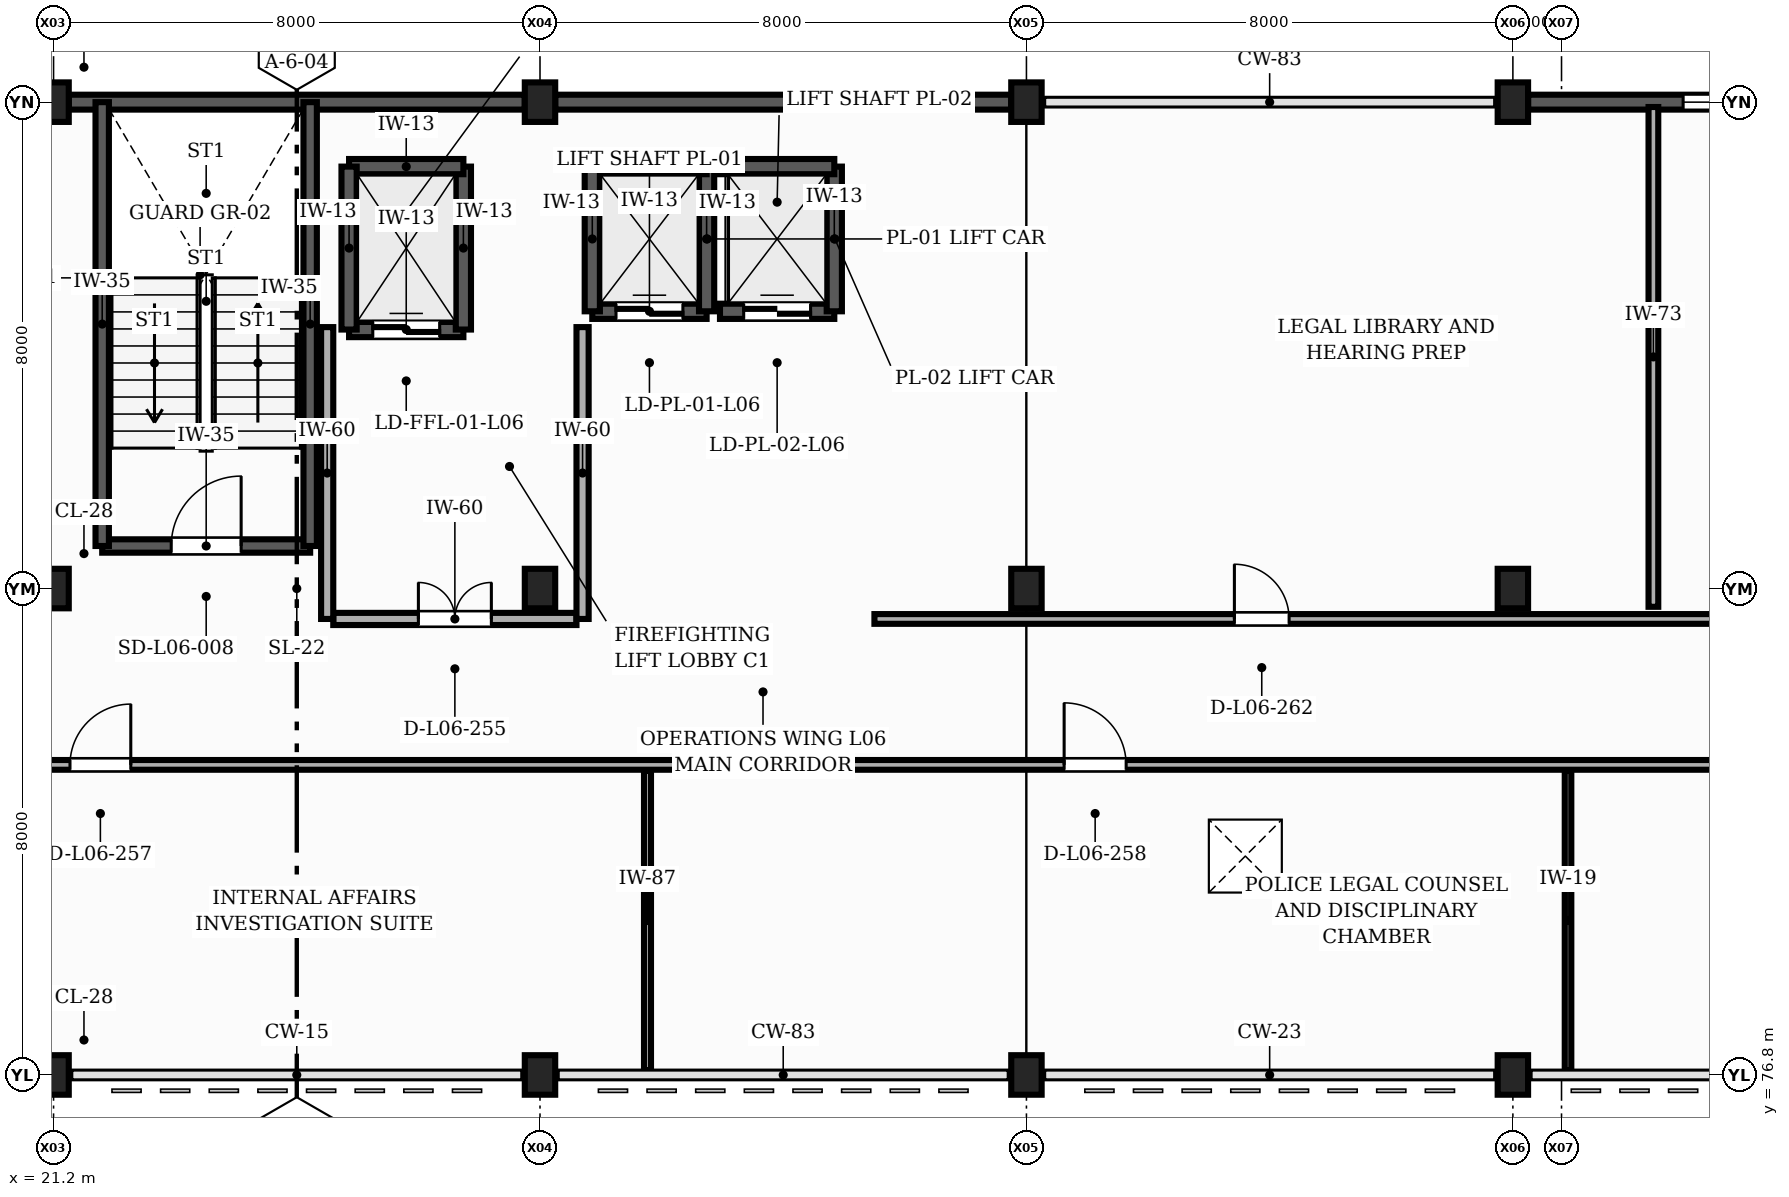
"""IFC4 building model, lengths in metres.
Left out: names, types, materials, properties, quantities, classifications, styles, units other than length and angle.
Written with IfcOpenShell. Run it as: python <this file> out.ifc"""

import sys

from ifc_helpers import new_model, si_unit, direction, frame, frame_2d, origin, origin_2d, place, context, subcontext, project, spatial, rectangle, extrude, element, fill, save


model = new_model("IFC4")
c1 = context("Model", 3, precision=1e-05, world=origin(), true_north=direction((0.0, 1.0)))
c2 = subcontext(c1, "Body", "Model", "MODEL_VIEW")
j1 = project(units=[si_unit("LENGTHUNIT", "METRE"), si_unit("PLANEANGLEUNIT", "RADIAN")], contexts=[c1])
p1 = place(None, origin())
s1 = spatial("IfcSite", under=j1, at=p1, CompositionType="ELEMENT")
p2 = place(p1, origin())
s2 = spatial("IfcBuilding", under=s1, at=p2, CompositionType="ELEMENT")
p3 = place(p2, frame((0.0, 0.0, 25.8)))
s3 = spatial("IfcBuildingStorey", under=s2, at=p3, CompositionType="ELEMENT", Elevation=25.8)
for number, where, z_axis, x_axis in (
    (1, (21.2, 76.8, 0.0), (0.0, 0.0, 1.0), (1.0, 0.0, 0.0)),
    (2, (21.2, 84.8, 0.0), (0.0, 0.0, 1.0), (1.0, 0.0, 0.0)),
    (3, (21.2, 92.8, 0.0), (0.0, 0.0, 1.0), (1.0, 0.0, 0.0)),
    (4, (29.2, 76.8, 0.0), (0.0, 0.0, 1.0), (1.0, 0.0, 0.0)),
    (5, (29.2, 84.8, 0.0), (0.0, 0.0, 1.0), (1.0, 0.0, 0.0)),
    (6, (29.2, 92.8, 0.0), (0.0, 0.0, 1.0), (1.0, 0.0, 0.0)),
    (7, (37.2, 76.8, 0.0), (0.0, 0.0, 1.0), (1.0, 0.0, 0.0)),
    (8, (37.2, 84.8, 0.0), (0.0, 0.0, 1.0), (1.0, 0.0, 0.0)),
    (9, (37.2, 92.8, 0.0), (0.0, 0.0, 1.0), (1.0, 0.0, 0.0)),
    (10, (45.2, 76.8, 0.0), (0.0, 0.0, 1.0), (1.0, 0.0, 0.0)),
    (11, (45.2, 84.8, 0.0), (0.0, 0.0, 1.0), (1.0, 0.0, 0.0)),
    (12, (45.2, 92.8, 0.0), (0.0, 0.0, 1.0), (1.0, 0.0, 0.0)),
):
    element("IfcColumn", number, at=place(p3, frame(where, z_axis=z_axis, x_axis=x_axis)), inside=s3, PredefinedType="COLUMN", context=c2, shape_type="SweptSolid", body=[
        extrude(rectangle(XDim=0.5, YDim=0.65, at=origin_2d()), origin(), (0.0, 0.0, 1.0), 3.9),
    ])
p4 = place(p3, frame((53.75, 92.8, 0.0), z_axis=(0.0, 0.0, 1.0), x_axis=(-1.0, 0.0, 0.0)))
e13 = element("IfcWall", 13, at=p4, inside=s3, PredefinedType="SOLIDWALL", context=c2, shape_type="SweptSolid", body=[
    extrude(rectangle(XDim=8.3, YDim=0.245, at=frame_2d((4.15, 0.0))), origin(), (0.0, 0.0, 1.0), 3.01),
])
p5 = place(p4, frame((2.55, 0.0, 0.9)))
e14 = element("IfcOpeningElement", 14, at=p5, cuts=e13, PredefinedType="OPENING", context=c2, shape_type="SweptSolid", body=[
    extrude(rectangle(XDim=3.2, YDim=1.6, at=frame_2d((1.6, 0.8))), frame((0.0, 0.133, 0.0), z_axis=(0.0, -1.0, 0.0), x_axis=(1.0, 0.0, 0.0)), (0.0, 0.0, 1.0), 0.265),
])
p6 = place(p3, frame((36.95, 92.8, 0.0), z_axis=(0.0, 0.0, 1.0), x_axis=(-1.0, 0.0, 0.0)))
e15 = element("IfcWall", 15, at=p6, inside=s3, PredefinedType="SOLIDWALL", context=c2, shape_type="SweptSolid", body=[
    extrude(rectangle(XDim=7.5, YDim=0.245, at=frame_2d((3.75, 0.0))), origin(), (0.0, 0.0, 1.0), 3.01),
])
p7 = place(p3, frame((28.95, 92.8, 0.0), z_axis=(0.0, 0.0, 1.0), x_axis=(-1.0, 0.0, 0.0)))
e16 = element("IfcWall", 16, at=p7, inside=s3, PredefinedType="SOLIDWALL", context=c2, shape_type="SweptSolid", body=[
    extrude(rectangle(XDim=7.5, YDim=0.245, at=frame_2d((3.75, 0.0))), origin(), (0.0, 0.0, 1.0), 3.66),
])
p8 = place(p3, frame((22.0, 85.5, 0.0), z_axis=(0.0, 0.0, 1.0), x_axis=(1.0, 0.0, 0.0)))
e17 = element("IfcWall", 17, at=p8, inside=s3, PredefinedType="SHEAR", context=c2, shape_type="SweptSolid", body=[
    extrude(rectangle(XDim=3.42, YDim=0.22, at=frame_2d((1.71, 0.0))), origin(), (0.0, 0.0, 1.0), 3.9),
])
p9 = place(p8, frame((1.135, 0.0, 0.0)))
e18 = element("IfcOpeningElement", 18, at=p9, cuts=e17, PredefinedType="OPENING", context=c2, shape_type="SweptSolid", body=[
    extrude(rectangle(XDim=1.15, YDim=2.15, at=frame_2d((0.575, 1.075))), frame((0.0, 0.12, 0.0), z_axis=(0.0, -1.0, 0.0), x_axis=(1.0, 0.0, 0.0)), (0.0, 0.0, 1.0), 0.24),
])
for number, where, z_axis, x_axis in (
    (19, (25.42, 85.5, 0.0), (0.0, 0.0, 1.0), (0.0, 1.0, 0.0)),
    (20, (22.0, 92.8, 0.0), (0.0, 0.0, 1.0), (0.0, -1.0, 0.0)),
):
    element("IfcWall", number, at=place(p3, frame(where, z_axis=z_axis, x_axis=x_axis)), inside=s3, PredefinedType="SHEAR", context=c2, shape_type="SweptSolid", body=[
        extrude(rectangle(XDim=7.3, YDim=0.22, at=frame_2d((3.65, 0.0))), origin(), (0.0, 0.0, 1.0), 3.9),
    ])
p10 = place(p3, frame((26.06, 89.06, 0.0), z_axis=(0.0, 0.0, 1.0), x_axis=(1.0, 0.0, 0.0)))
e21 = element("IfcWall", 21, at=p10, inside=s3, PredefinedType="SHEAR", context=c2, shape_type="SweptSolid", body=[
    extrude(rectangle(XDim=1.88, YDim=0.25, at=frame_2d((0.94, 0.0))), origin(), (0.0, 0.0, 1.0), 3.9),
])
p11 = place(p10, frame((0.39, 0.0, 0.0)))
e22 = element("IfcOpeningElement", 22, at=p11, cuts=e21, PredefinedType="OPENING", context=c2, shape_type="SweptSolid", body=[
    extrude(rectangle(XDim=1.1, YDim=2.2, at=frame_2d((0.55, 1.1))), frame((0.0, 0.135, 0.0), z_axis=(0.0, -1.0, 0.0), x_axis=(1.0, 0.0, 0.0)), (0.0, 0.0, 1.0), 0.27),
])
p12 = place(p3, frame((27.94, 89.06, 0.0), z_axis=(0.0, 0.0, 1.0), x_axis=(0.0, 1.0, 0.0)))
e23 = element("IfcWall", 23, at=p12, inside=s3, PredefinedType="SHEAR", context=c2, shape_type="SweptSolid", body=[
    extrude(rectangle(XDim=2.68, YDim=0.25, at=frame_2d((1.34, 0.0))), origin(), (0.0, 0.0, 1.0), 3.9),
])
p13 = place(p3, frame((27.94, 91.74, 0.0), z_axis=(0.0, 0.0, 1.0), x_axis=(-1.0, 0.0, 0.0)))
e24 = element("IfcWall", 24, at=p13, inside=s3, PredefinedType="SHEAR", context=c2, shape_type="SweptSolid", body=[
    extrude(rectangle(XDim=1.88, YDim=0.25, at=frame_2d((0.94, 0.0))), origin(), (0.0, 0.0, 1.0), 3.9),
])
p14 = place(p3, frame((26.06, 91.74, 0.0), z_axis=(0.0, 0.0, 1.0), x_axis=(0.0, -1.0, 0.0)))
e25 = element("IfcWall", 25, at=p14, inside=s3, PredefinedType="SHEAR", context=c2, shape_type="SweptSolid", body=[
    extrude(rectangle(XDim=2.68, YDim=0.25, at=frame_2d((1.34, 0.0))), origin(), (0.0, 0.0, 1.0), 3.9),
])
p15 = place(p3, frame((30.06, 89.36, 0.0), z_axis=(0.0, 0.0, 1.0), x_axis=(1.0, 0.0, 0.0)))
e26 = element("IfcWall", 26, at=p15, inside=s3, PredefinedType="SHEAR", context=c2, shape_type="SweptSolid", body=[
    extrude(rectangle(XDim=1.88, YDim=0.25, at=frame_2d((0.94, 0.0))), origin(), (0.0, 0.0, 1.0), 3.9),
])
p16 = place(p15, frame((0.39, 0.0, 0.0)))
e27 = element("IfcOpeningElement", 27, at=p16, cuts=e26, PredefinedType="OPENING", context=c2, shape_type="SweptSolid", body=[
    extrude(rectangle(XDim=1.1, YDim=2.2, at=frame_2d((0.55, 1.1))), frame((0.0, 0.135, 0.0), z_axis=(0.0, -1.0, 0.0), x_axis=(1.0, 0.0, 0.0)), (0.0, 0.0, 1.0), 0.27),
])
p17 = place(p3, frame((31.94, 89.36, 0.0), z_axis=(0.0, 0.0, 1.0), x_axis=(0.0, 1.0, 0.0)))
e28 = element("IfcWall", 28, at=p17, inside=s3, PredefinedType="SHEAR", context=c2, shape_type="SweptSolid", body=[
    extrude(rectangle(XDim=2.38, YDim=0.25, at=frame_2d((1.19, 0.0))), origin(), (0.0, 0.0, 1.0), 3.9),
])
p18 = place(p3, frame((31.94, 91.74, 0.0), z_axis=(0.0, 0.0, 1.0), x_axis=(-1.0, 0.0, 0.0)))
e29 = element("IfcWall", 29, at=p18, inside=s3, PredefinedType="SHEAR", context=c2, shape_type="SweptSolid", body=[
    extrude(rectangle(XDim=1.88, YDim=0.25, at=frame_2d((0.94, 0.0))), origin(), (0.0, 0.0, 1.0), 3.9),
])
p19 = place(p3, frame((30.06, 91.74, 0.0), z_axis=(0.0, 0.0, 1.0), x_axis=(0.0, -1.0, 0.0)))
e30 = element("IfcWall", 30, at=p19, inside=s3, PredefinedType="SHEAR", context=c2, shape_type="SweptSolid", body=[
    extrude(rectangle(XDim=2.38, YDim=0.25, at=frame_2d((1.19, 0.0))), origin(), (0.0, 0.0, 1.0), 3.9),
])
p20 = place(p3, frame((32.16, 89.36, 0.0), z_axis=(0.0, 0.0, 1.0), x_axis=(1.0, 0.0, 0.0)))
e31 = element("IfcWall", 31, at=p20, inside=s3, PredefinedType="SHEAR", context=c2, shape_type="SweptSolid", body=[
    extrude(rectangle(XDim=1.88, YDim=0.25, at=frame_2d((0.94, 0.0))), origin(), (0.0, 0.0, 1.0), 3.9),
])
p21 = place(p20, frame((0.39, 0.0, 0.0)))
e32 = element("IfcOpeningElement", 32, at=p21, cuts=e31, PredefinedType="OPENING", context=c2, shape_type="SweptSolid", body=[
    extrude(rectangle(XDim=1.1, YDim=2.2, at=frame_2d((0.55, 1.1))), frame((0.0, 0.135, 0.0), z_axis=(0.0, -1.0, 0.0), x_axis=(1.0, 0.0, 0.0)), (0.0, 0.0, 1.0), 0.27),
])
p22 = place(p3, frame((34.04, 89.36, 0.0), z_axis=(0.0, 0.0, 1.0), x_axis=(0.0, 1.0, 0.0)))
e33 = element("IfcWall", 33, at=p22, inside=s3, PredefinedType="SHEAR", context=c2, shape_type="SweptSolid", body=[
    extrude(rectangle(XDim=2.38, YDim=0.25, at=frame_2d((1.19, 0.0))), origin(), (0.0, 0.0, 1.0), 3.9),
])
p23 = place(p3, frame((34.04, 91.74, 0.0), z_axis=(0.0, 0.0, 1.0), x_axis=(-1.0, 0.0, 0.0)))
e34 = element("IfcWall", 34, at=p23, inside=s3, PredefinedType="SHEAR", context=c2, shape_type="SweptSolid", body=[
    extrude(rectangle(XDim=1.88, YDim=0.25, at=frame_2d((0.94, 0.0))), origin(), (0.0, 0.0, 1.0), 3.9),
])
p24 = place(p3, frame((25.8, 84.3, 0.0), z_axis=(0.0, 0.0, 1.0), x_axis=(1.0, 0.0, 0.0)))
e35 = element("IfcWall", 35, at=p24, inside=s3, PredefinedType="PARTITIONING", context=c2, shape_type="SweptSolid", body=[
    extrude(rectangle(XDim=4.0, YDim=0.2, at=frame_2d((2.0, 0.0))), origin(), (0.0, 0.0, 1.0), 2.895),
])
p25 = place(p24, frame((1.4, 0.0, 0.0)))
e36 = element("IfcOpeningElement", 36, at=p25, cuts=e35, PredefinedType="OPENING", context=c2, shape_type="SweptSolid", body=[
    extrude(rectangle(XDim=1.2, YDim=2.15, at=frame_2d((0.6, 1.075))), frame((0.0, 0.11, 0.0), z_axis=(0.0, -1.0, 0.0), x_axis=(1.0, 0.0, 0.0)), (0.0, 0.0, 1.0), 0.22),
])
p26 = place(p3, frame((25.7, 84.3, 0.0), z_axis=(0.0, 0.0, 1.0), x_axis=(0.0, 1.0, 0.0)))
e37 = element("IfcWall", 37, at=p26, inside=s3, PredefinedType="PARTITIONING", context=c2, shape_type="SweptSolid", body=[
    extrude(rectangle(XDim=4.8, YDim=0.2, at=frame_2d((2.4, 0.0))), origin(), (0.0, 0.0, 1.0), 3.045),
])
p27 = place(p3, frame((29.9, 84.3, 0.0), z_axis=(0.0, 0.0, 1.0), x_axis=(0.0, 1.0, 0.0)))
e38 = element("IfcWall", 38, at=p27, inside=s3, PredefinedType="PARTITIONING", context=c2, shape_type="SweptSolid", body=[
    extrude(rectangle(XDim=4.8, YDim=0.2, at=frame_2d((2.4, 0.0))), origin(), (0.0, 0.0, 1.0), 3.095),
])
p28 = place(p3, frame((30.968, 76.88, 0.0), z_axis=(0.0, 0.0, 1.0), x_axis=(0.0, 1.0, 0.0)))
e39 = element("IfcWall", 39, at=p28, inside=s3, PredefinedType="PARTITIONING", context=c2, shape_type="SweptSolid", body=[
    extrude(rectangle(XDim=4.92, YDim=0.115, at=frame_2d((2.46, 0.0))), origin(), (0.0, 0.0, 1.0), 3.66),
])
p29 = place(p3, frame((46.107, 76.88, 0.0), z_axis=(0.0, 0.0, 1.0), x_axis=(0.0, 1.0, 0.0)))
e40 = element("IfcWall", 40, at=p29, inside=s3, PredefinedType="PARTITIONING", context=c2, shape_type="SweptSolid", body=[
    extrude(rectangle(XDim=4.92, YDim=0.108, at=frame_2d((2.46, 0.0))), origin(), (0.0, 0.0, 1.0), 3.66),
])
p30 = place(p3, frame((13.28, 81.9, 0.0), z_axis=(0.0, 0.0, 1.0), x_axis=(1.0, 0.0, 0.0)))
e41 = element("IfcWall", 41, at=p30, inside=s3, PredefinedType="PARTITIONING", context=c2, shape_type="SweptSolid", body=[
    extrude(rectangle(XDim=72.64, YDim=0.16, at=frame_2d((36.32, 0.0))), origin(), (0.0, 0.0, 1.0), 2.895),
])
p31 = place(p30, frame((8.19, 0.0, 0.0)))
e42 = element("IfcOpeningElement", 42, at=p31, cuts=e41, PredefinedType="OPENING", context=c2, shape_type="SweptSolid", body=[
    extrude(rectangle(XDim=1.0, YDim=2.1, at=frame_2d((0.5, 1.05))), frame((0.0, 0.09, 0.0), z_axis=(0.0, -1.0, 0.0), x_axis=(1.0, 0.0, 0.0)), (0.0, 0.0, 1.0), 0.18),
])
p32 = place(p30, frame((24.54, 0.0, 0.0)))
e43 = element("IfcOpeningElement", 43, at=p32, cuts=e41, PredefinedType="OPENING", context=c2, shape_type="SweptSolid", body=[
    extrude(rectangle(XDim=1.02, YDim=2.12, at=frame_2d((0.51, 1.06))), frame((0.0, 0.09, 0.0), z_axis=(0.0, -1.0, 0.0), x_axis=(1.0, 0.0, 0.0)), (0.0, 0.0, 1.0), 0.18),
])
p33 = place(p30, frame((39.68, 0.0, 0.0)))
e44 = element("IfcOpeningElement", 44, at=p33, cuts=e41, PredefinedType="OPENING", context=c2, shape_type="SweptSolid", body=[
    extrude(rectangle(XDim=1.05, YDim=2.1, at=frame_2d((0.525, 1.05))), frame((0.0, 0.09, 0.0), z_axis=(0.0, -1.0, 0.0), x_axis=(1.0, 0.0, 0.0)), (0.0, 0.0, 1.0), 0.18),
])
p34 = place(p30, frame((53.07, 0.0, 0.0)))
e45 = element("IfcOpeningElement", 45, at=p34, cuts=e41, PredefinedType="OPENING", context=c2, shape_type="SweptSolid", body=[
    extrude(rectangle(XDim=1.08, YDim=2.14, at=frame_2d((0.54, 1.07))), frame((0.0, 0.09, 0.0), z_axis=(0.0, -1.0, 0.0), x_axis=(1.0, 0.0, 0.0)), (0.0, 0.0, 1.0), 0.18),
])
p35 = place(p30, frame((65.34, 0.0, 0.0)))
e46 = element("IfcOpeningElement", 46, at=p35, cuts=e41, PredefinedType="OPENING", context=c2, shape_type="SweptSolid", body=[
    extrude(rectangle(XDim=1.1, YDim=2.1, at=frame_2d((0.55, 1.05))), frame((0.0, 0.09, 0.0), z_axis=(0.0, -1.0, 0.0), x_axis=(1.0, 0.0, 0.0)), (0.0, 0.0, 1.0), 0.18),
])
p36 = place(p3, frame((47.511, 84.5, 0.0), z_axis=(0.0, 0.0, 1.0), x_axis=(0.0, 1.0, 0.0)))
e47 = element("IfcWall", 47, at=p36, inside=s3, PredefinedType="PARTITIONING", context=c2, shape_type="SweptSolid", body=[
    extrude(rectangle(XDim=8.22, YDim=0.16, at=frame_2d((4.11, 0.0))), origin(), (0.0, 0.0, 1.0), 2.895),
])
p37 = place(p3, frame((34.7, 84.3, 0.0), z_axis=(0.0, 0.0, 1.0), x_axis=(1.0, 0.0, 0.0)))
e48 = element("IfcWall", 48, at=p37, inside=s3, PredefinedType="PARTITIONING", context=c2, shape_type="SweptSolid", body=[
    extrude(rectangle(XDim=35.4, YDim=0.16, at=frame_2d((17.7, 0.0))), origin(), (0.0, 0.0, 1.0), 2.895),
])
p38 = place(p37, frame((5.92, 0.0, 0.0)))
e49 = element("IfcOpeningElement", 49, at=p38, cuts=e48, PredefinedType="OPENING", context=c2, shape_type="SweptSolid", body=[
    extrude(rectangle(XDim=0.9, YDim=2.1, at=frame_2d((0.45, 1.05))), frame((0.0, 0.09, 0.0), z_axis=(0.0, -1.0, 0.0), x_axis=(1.0, 0.0, 0.0)), (0.0, 0.0, 1.0), 0.18),
])
p39 = place(p37, frame((17.2, 0.0, 0.0)))
e50 = element("IfcOpeningElement", 50, at=p39, cuts=e48, PredefinedType="OPENING", context=c2, shape_type="SweptSolid", body=[
    extrude(rectangle(XDim=0.95, YDim=2.15, at=frame_2d((0.475, 1.075))), frame((0.0, 0.09, 0.0), z_axis=(0.0, -1.0, 0.0), x_axis=(1.0, 0.0, 0.0)), (0.0, 0.0, 1.0), 0.18),
])
p40 = place(p37, frame((28.48, 0.0, 0.0)))
e51 = element("IfcOpeningElement", 51, at=p40, cuts=e48, PredefinedType="OPENING", context=c2, shape_type="SweptSolid", body=[
    extrude(rectangle(XDim=0.95, YDim=2.1, at=frame_2d((0.475, 1.05))), frame((0.0, 0.09, 0.0), z_axis=(0.0, -1.0, 0.0), x_axis=(1.0, 0.0, 0.0)), (0.0, 0.0, 1.0), 0.18),
])
p41 = place(p5, origin())
e52 = element("IfcWindow", 52, at=p41, inside=s3, PartitioningType="SINGLE_PANEL", PredefinedType="WINDOW", context=c2, shape_type="SweptSolid", body=[
    extrude(rectangle(XDim=3.2, YDim=1.6, at=frame_2d((1.6, 0.8))), frame((0.0, 0.03, 0.0), z_axis=(0.0, -1.0, 0.0), x_axis=(1.0, 0.0, 0.0)), (0.0, 0.0, 1.0), 0.06),
])
fill(e14, e52)
p42 = place(p9, origin())
e53 = element("IfcDoor", 53, at=p42, inside=s3, OperationType="SINGLE_SWING_RIGHT", PredefinedType="DOOR", context=c2, shape_type="SweptSolid", body=[
    extrude(rectangle(XDim=1.15, YDim=2.15, at=frame_2d((0.575, 1.075))), frame((0.0, 0.025, 0.0), z_axis=(0.0, -1.0, 0.0), x_axis=(1.0, 0.0, 0.0)), (0.0, 0.0, 1.0), 0.05),
])
fill(e18, e53)
p43 = place(p11, origin())
e54 = element("IfcDoor", 54, at=p43, inside=s3, OperationType="DOUBLE_DOOR_SLIDING", PredefinedType="DOOR", context=c2, shape_type="SweptSolid", body=[
    extrude(rectangle(XDim=1.1, YDim=2.2, at=frame_2d((0.55, 1.1))), frame((0.0, 0.025, 0.0), z_axis=(0.0, -1.0, 0.0), x_axis=(1.0, 0.0, 0.0)), (0.0, 0.0, 1.0), 0.05),
])
fill(e22, e54)
p44 = place(p16, origin())
e55 = element("IfcDoor", 55, at=p44, inside=s3, OperationType="DOUBLE_DOOR_SLIDING", PredefinedType="DOOR", context=c2, shape_type="SweptSolid", body=[
    extrude(rectangle(XDim=1.1, YDim=2.2, at=frame_2d((0.55, 1.1))), frame((0.0, 0.025, 0.0), z_axis=(0.0, -1.0, 0.0), x_axis=(1.0, 0.0, 0.0)), (0.0, 0.0, 1.0), 0.05),
])
fill(e27, e55)
p45 = place(p21, origin())
e56 = element("IfcDoor", 56, at=p45, inside=s3, OperationType="DOUBLE_DOOR_SLIDING", PredefinedType="DOOR", context=c2, shape_type="SweptSolid", body=[
    extrude(rectangle(XDim=1.1, YDim=2.2, at=frame_2d((0.55, 1.1))), frame((0.0, 0.025, 0.0), z_axis=(0.0, -1.0, 0.0), x_axis=(1.0, 0.0, 0.0)), (0.0, 0.0, 1.0), 0.05),
])
fill(e32, e56)
p46 = place(p25, origin())
e57 = element("IfcDoor", 57, at=p46, inside=s3, OperationType="DOUBLE_DOOR_SINGLE_SWING", PredefinedType="DOOR", context=c2, shape_type="SweptSolid", body=[
    extrude(rectangle(XDim=1.2, YDim=2.15, at=frame_2d((0.6, 1.075))), frame((0.0, 0.025, 0.0), z_axis=(0.0, -1.0, 0.0), x_axis=(1.0, 0.0, 0.0)), (0.0, 0.0, 1.0), 0.05),
])
fill(e36, e57)
p47 = place(p31, origin())
e58 = element("IfcDoor", 58, at=p47, inside=s3, OperationType="SINGLE_SWING_RIGHT", PredefinedType="DOOR", context=c2, shape_type="SweptSolid", body=[
    extrude(rectangle(XDim=1.0, YDim=2.1, at=frame_2d((0.5, 1.05))), frame((0.0, 0.025, 0.0), z_axis=(0.0, -1.0, 0.0), x_axis=(1.0, 0.0, 0.0)), (0.0, 0.0, 1.0), 0.05),
])
fill(e42, e58)
p48 = place(p32, origin())
e59 = element("IfcDoor", 59, at=p48, inside=s3, OperationType="SINGLE_SWING_LEFT", PredefinedType="DOOR", context=c2, shape_type="SweptSolid", body=[
    extrude(rectangle(XDim=1.02, YDim=2.12, at=frame_2d((0.51, 1.06))), frame((0.0, 0.025, 0.0), z_axis=(0.0, -1.0, 0.0), x_axis=(1.0, 0.0, 0.0)), (0.0, 0.0, 1.0), 0.05),
])
fill(e43, e59)
p49 = place(p38, origin())
e60 = element("IfcDoor", 60, at=p49, inside=s3, OperationType="SINGLE_SWING_LEFT", PredefinedType="DOOR", context=c2, shape_type="SweptSolid", body=[
    extrude(rectangle(XDim=0.9, YDim=2.1, at=frame_2d((0.45, 1.05))), frame((0.0, 0.025, 0.0), z_axis=(0.0, -1.0, 0.0), x_axis=(1.0, 0.0, 0.0)), (0.0, 0.0, 1.0), 0.05),
])
fill(e49, e60)
save(model, sys.argv[1])
